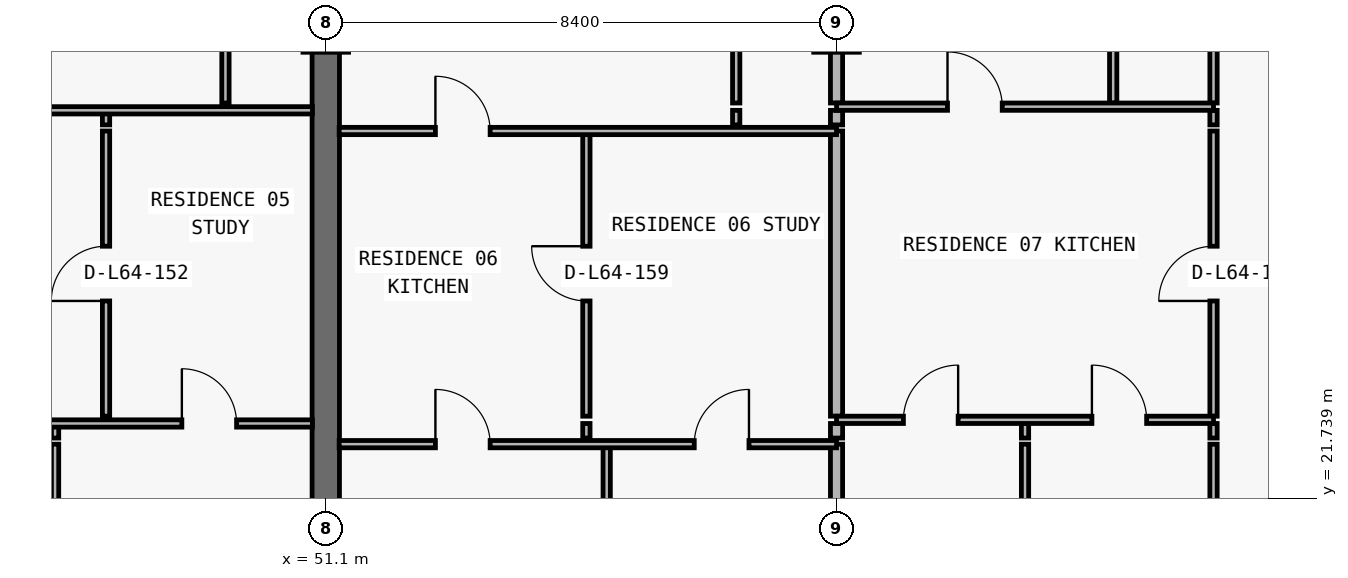
"""IFC4 building model, lengths in metres.
Left out: names, types, materials, properties, quantities, classifications, styles, units other than length and angle.
Written with IfcOpenShell. Run it as: python <this file> out.ifc"""

import sys

from ifc_helpers import new_model, si_unit, direction, frame, frame_2d, origin, place, context, subcontext, project, spatial, rectangle, extrude, element, fill, save


model = new_model("IFC4")
c1 = context("Model", 3, precision=1e-05, world=origin(), true_north=direction((0.0, 1.0)))
c2 = subcontext(c1, "Body", "Model", "MODEL_VIEW")
j1 = project(units=[si_unit("LENGTHUNIT", "METRE"), si_unit("PLANEANGLEUNIT", "RADIAN")], contexts=[c1])
p1 = place(None, origin())
s1 = spatial("IfcSite", under=j1, at=p1, CompositionType="ELEMENT")
p2 = place(p1, origin())
s2 = spatial("IfcBuilding", under=s1, at=p2, CompositionType="ELEMENT")
p3 = place(p2, frame((0.0, 0.0, 229.8)))
s3 = spatial("IfcBuildingStorey", under=s2, at=p3, CompositionType="ELEMENT", Elevation=229.8)
p4 = place(p3, frame((51.1, 20.8, 0.0), z_axis=(0.0, 0.0, 1.0), x_axis=(0.0, 1.0, 0.0)))
e1 = element("IfcWall", 1, at=p4, inside=s3, PredefinedType="SHEAR", context=c2, shape_type="SweptSolid", body=[
    extrude(rectangle(XDim=8.6, YDim=0.45, at=frame_2d((4.3, 0.0))), origin(), (0.0, 0.0, 1.0), 3.05),
])
p5 = place(p3, frame((46.648, 13.34, 0.0), z_axis=(0.0, 0.0, 1.0), x_axis=(0.0, 1.0, 0.0)))
e2 = element("IfcWall", 2, at=p5, inside=s3, PredefinedType="PARTITIONING", context=c2, shape_type="SweptSolid", body=[
    extrude(rectangle(XDim=9.29, YDim=0.12, at=frame_2d((4.645, 0.0))), origin(), (0.0, 0.0, 1.0), 3.05),
])
p6 = place(p3, frame((46.648, 22.73, 0.0), z_axis=(0.0, 0.0, 1.0), x_axis=(0.0, 1.0, 0.0)))
e3 = element("IfcWall", 3, at=p6, inside=s3, PredefinedType="PARTITIONING", context=c2, shape_type="SweptSolid", body=[
    extrude(rectangle(XDim=0.24, YDim=0.12, at=frame_2d((0.12, 0.0))), origin(), (0.0, 0.0, 1.0), 3.05),
])
p7 = place(p3, frame((47.486, 23.09, 0.0), z_axis=(0.0, 0.0, 1.0), x_axis=(0.0, 1.0, 0.0)))
e4 = element("IfcWall", 4, at=p7, inside=s3, PredefinedType="PARTITIONING", context=c2, shape_type="SweptSolid", body=[
    extrude(rectangle(XDim=4.69, YDim=0.12, at=frame_2d((2.345, 0.0))), origin(), (0.0, 0.0, 1.0), 3.05),
])
p8 = place(p7, frame((1.895, 0.0, 0.0)))
e5 = element("IfcOpeningElement", 5, at=p8, cuts=e4, PredefinedType="OPENING", context=c2, shape_type="SweptSolid", body=[
    extrude(rectangle(XDim=0.9, YDim=2.15, at=frame_2d((0.45, 1.075))), frame((0.0, 0.07, 0.0), z_axis=(0.0, -1.0, 0.0), x_axis=(1.0, 0.0, 0.0)), (0.0, 0.0, 1.0), 0.14),
])
p9 = place(p3, frame((47.486, 27.88, 0.0), z_axis=(0.0, 0.0, 1.0), x_axis=(0.0, 1.0, 0.0)))
e6 = element("IfcWall", 6, at=p9, inside=s3, PredefinedType="PARTITIONING", context=c2, shape_type="SweptSolid", body=[
    extrude(rectangle(XDim=0.24, YDim=0.12, at=frame_2d((0.12, 0.0))), origin(), (0.0, 0.0, 1.0), 3.05),
])
p10 = place(p3, frame((49.45, 28.24, 0.0), z_axis=(0.0, 0.0, 1.0), x_axis=(0.0, 1.0, 0.0)))
e7 = element("IfcWall", 7, at=p10, inside=s3, PredefinedType="PARTITIONING", context=c2, shape_type="SweptSolid", body=[
    extrude(rectangle(XDim=6.26, YDim=0.12, at=frame_2d((3.13, 0.0))), origin(), (0.0, 0.0, 1.0), 3.05),
])
p11 = place(p10, frame((2.705, 0.0, 0.0)))
e8 = element("IfcOpeningElement", 8, at=p11, cuts=e7, PredefinedType="OPENING", context=c2, shape_type="SweptSolid", body=[
    extrude(rectangle(XDim=0.85, YDim=2.1, at=frame_2d((0.425, 1.05))), frame((0.0, 0.07, 0.0), z_axis=(0.0, -1.0, 0.0), x_axis=(1.0, 0.0, 0.0)), (0.0, 0.0, 1.0), 0.14),
])
p12 = place(p3, frame((55.386, 22.73, 0.0), z_axis=(0.0, 0.0, 1.0), x_axis=(0.0, 1.0, 0.0)))
e9 = element("IfcWall", 9, at=p12, inside=s3, PredefinedType="PARTITIONING", context=c2, shape_type="SweptSolid", body=[
    extrude(rectangle(XDim=0.24, YDim=0.12, at=frame_2d((0.12, 0.0))), origin(), (0.0, 0.0, 1.0), 3.05),
])
p13 = place(p3, frame((55.386, 23.09, 0.0), z_axis=(0.0, 0.0, 1.0), x_axis=(0.0, 1.0, 0.0)))
e10 = element("IfcWall", 10, at=p13, inside=s3, PredefinedType="PARTITIONING", context=c2, shape_type="SweptSolid", body=[
    extrude(rectangle(XDim=4.69, YDim=0.12, at=frame_2d((2.345, 0.0))), origin(), (0.0, 0.0, 1.0), 3.05),
])
p14 = place(p13, frame((1.895, 0.0, 0.0)))
e11 = element("IfcOpeningElement", 11, at=p14, cuts=e10, PredefinedType="OPENING", context=c2, shape_type="SweptSolid", body=[
    extrude(rectangle(XDim=0.9, YDim=2.15, at=frame_2d((0.45, 1.075))), frame((0.0, 0.07, 0.0), z_axis=(0.0, -1.0, 0.0), x_axis=(1.0, 0.0, 0.0)), (0.0, 0.0, 1.0), 0.14),
])
p15 = place(p3, frame((55.72, 13.34, 0.0), z_axis=(0.0, 0.0, 1.0), x_axis=(0.0, 1.0, 0.0)))
e12 = element("IfcWall", 12, at=p15, inside=s3, PredefinedType="PARTITIONING", context=c2, shape_type="SweptSolid", body=[
    extrude(rectangle(XDim=9.29, YDim=0.12, at=frame_2d((4.645, 0.0))), origin(), (0.0, 0.0, 1.0), 3.05),
])
p16 = place(p3, frame((57.85, 27.88, 0.0), z_axis=(0.0, 0.0, 1.0), x_axis=(0.0, 1.0, 0.0)))
e13 = element("IfcWall", 13, at=p16, inside=s3, PredefinedType="PARTITIONING", context=c2, shape_type="SweptSolid", body=[
    extrude(rectangle(XDim=0.24, YDim=0.12, at=frame_2d((0.12, 0.0))), origin(), (0.0, 0.0, 1.0), 3.05),
])
p17 = place(p3, frame((57.85, 28.24, 0.0), z_axis=(0.0, 0.0, 1.0), x_axis=(0.0, 1.0, 0.0)))
e14 = element("IfcWall", 14, at=p17, inside=s3, PredefinedType="PARTITIONING", context=c2, shape_type="SweptSolid", body=[
    extrude(rectangle(XDim=6.26, YDim=0.12, at=frame_2d((3.13, 0.0))), origin(), (0.0, 0.0, 1.0), 3.05),
])
p18 = place(p17, frame((2.705, 0.0, 0.0)))
e15 = element("IfcOpeningElement", 15, at=p18, cuts=e14, PredefinedType="OPENING", context=c2, shape_type="SweptSolid", body=[
    extrude(rectangle(XDim=0.85, YDim=2.1, at=frame_2d((0.425, 1.05))), frame((0.0, 0.07, 0.0), z_axis=(0.0, -1.0, 0.0), x_axis=(1.0, 0.0, 0.0)), (0.0, 0.0, 1.0), 0.14),
])
p19 = place(p3, frame((59.5, 13.34, 0.0), z_axis=(0.0, 0.0, 1.0), x_axis=(0.0, 1.0, 0.0)))
e16 = element("IfcWall", 16, at=p19, inside=s3, PredefinedType="PARTITIONING", context=c2, shape_type="SweptSolid", body=[
    extrude(rectangle(XDim=9.29, YDim=0.2, at=frame_2d((4.645, 0.0))), origin(), (0.0, 0.0, 1.0), 2.263),
])
p20 = place(p3, frame((59.5, 22.73, 0.0), z_axis=(0.0, 0.0, 1.0), x_axis=(0.0, 1.0, 0.0)))
e17 = element("IfcWall", 17, at=p20, inside=s3, PredefinedType="PARTITIONING", context=c2, shape_type="SweptSolid", body=[
    extrude(rectangle(XDim=0.24, YDim=0.2, at=frame_2d((0.12, 0.0))), origin(), (0.0, 0.0, 1.0), 2.263),
])
p21 = place(p3, frame((59.5, 23.09, 0.0), z_axis=(0.0, 0.0, 1.0), x_axis=(0.0, 1.0, 0.0)))
e18 = element("IfcWall", 18, at=p21, inside=s3, PredefinedType="PARTITIONING", context=c2, shape_type="SweptSolid", body=[
    extrude(rectangle(XDim=4.69, YDim=0.2, at=frame_2d((2.345, 0.0))), origin(), (0.0, 0.0, 1.0), 2.263),
])
p22 = place(p3, frame((59.5, 27.88, 0.0), z_axis=(0.0, 0.0, 1.0), x_axis=(0.0, 1.0, 0.0)))
e19 = element("IfcWall", 19, at=p22, inside=s3, PredefinedType="PARTITIONING", context=c2, shape_type="SweptSolid", body=[
    extrude(rectangle(XDim=0.24, YDim=0.2, at=frame_2d((0.12, 0.0))), origin(), (0.0, 0.0, 1.0), 2.263),
])
p23 = place(p3, frame((59.5, 28.24, 0.0), z_axis=(0.0, 0.0, 1.0), x_axis=(0.0, 1.0, 0.0)))
e20 = element("IfcWall", 20, at=p23, inside=s3, PredefinedType="PARTITIONING", context=c2, shape_type="SweptSolid", body=[
    extrude(rectangle(XDim=6.26, YDim=0.2, at=frame_2d((3.13, 0.0))), origin(), (0.0, 0.0, 1.0), 2.263),
])
p24 = place(p3, frame((62.6, 13.34, 0.0), z_axis=(0.0, 0.0, 1.0), x_axis=(0.0, 1.0, 0.0)))
e21 = element("IfcWall", 21, at=p24, inside=s3, PredefinedType="PARTITIONING", context=c2, shape_type="SweptSolid", body=[
    extrude(rectangle(XDim=9.29, YDim=0.12, at=frame_2d((4.645, 0.0))), origin(), (0.0, 0.0, 1.0), 3.05),
])
p25 = place(p3, frame((62.6, 22.73, 0.0), z_axis=(0.0, 0.0, 1.0), x_axis=(0.0, 1.0, 0.0)))
e22 = element("IfcWall", 22, at=p25, inside=s3, PredefinedType="PARTITIONING", context=c2, shape_type="SweptSolid", body=[
    extrude(rectangle(XDim=0.24, YDim=0.12, at=frame_2d((0.12, 0.0))), origin(), (0.0, 0.0, 1.0), 3.05),
])
p26 = place(p3, frame((64.05, 28.24, 0.0), z_axis=(0.0, 0.0, 1.0), x_axis=(0.0, 1.0, 0.0)))
e23 = element("IfcWall", 23, at=p26, inside=s3, PredefinedType="PARTITIONING", context=c2, shape_type="SweptSolid", body=[
    extrude(rectangle(XDim=6.26, YDim=0.12, at=frame_2d((3.13, 0.0))), origin(), (0.0, 0.0, 1.0), 3.05),
])
p27 = place(p26, frame((2.705, 0.0, 0.0)))
e24 = element("IfcOpeningElement", 24, at=p27, cuts=e23, PredefinedType="OPENING", context=c2, shape_type="SweptSolid", body=[
    extrude(rectangle(XDim=0.85, YDim=2.1, at=frame_2d((0.425, 1.05))), frame((0.0, 0.07, 0.0), z_axis=(0.0, -1.0, 0.0), x_axis=(1.0, 0.0, 0.0)), (0.0, 0.0, 1.0), 0.14),
])
p28 = place(p3, frame((65.7, 13.42, 0.0), z_axis=(0.0, 0.0, 1.0), x_axis=(0.0, 1.0, 0.0)))
e25 = element("IfcWall", 25, at=p28, inside=s3, PredefinedType="PARTITIONING", context=c2, shape_type="SweptSolid", body=[
    extrude(rectangle(XDim=9.21, YDim=0.12, at=frame_2d((4.605, 0.0))), origin(), (0.0, 0.0, 1.0), 3.05),
])
p29 = place(p3, frame((65.7, 22.73, 0.0), z_axis=(0.0, 0.0, 1.0), x_axis=(0.0, 1.0, 0.0)))
e26 = element("IfcWall", 26, at=p29, inside=s3, PredefinedType="PARTITIONING", context=c2, shape_type="SweptSolid", body=[
    extrude(rectangle(XDim=0.24, YDim=0.12, at=frame_2d((0.12, 0.0))), origin(), (0.0, 0.0, 1.0), 3.05),
])
p30 = place(p3, frame((65.7, 23.09, 0.0), z_axis=(0.0, 0.0, 1.0), x_axis=(0.0, 1.0, 0.0)))
e27 = element("IfcWall", 27, at=p30, inside=s3, PredefinedType="PARTITIONING", context=c2, shape_type="SweptSolid", body=[
    extrude(rectangle(XDim=4.69, YDim=0.12, at=frame_2d((2.345, 0.0))), origin(), (0.0, 0.0, 1.0), 3.05),
])
p31 = place(p30, frame((1.895, 0.0, 0.0)))
e28 = element("IfcOpeningElement", 28, at=p31, cuts=e27, PredefinedType="OPENING", context=c2, shape_type="SweptSolid", body=[
    extrude(rectangle(XDim=0.9, YDim=2.15, at=frame_2d((0.45, 1.075))), frame((0.0, 0.07, 0.0), z_axis=(0.0, -1.0, 0.0), x_axis=(1.0, 0.0, 0.0)), (0.0, 0.0, 1.0), 0.14),
])
p32 = place(p3, frame((65.7, 27.88, 0.0), z_axis=(0.0, 0.0, 1.0), x_axis=(0.0, 1.0, 0.0)))
e29 = element("IfcWall", 29, at=p32, inside=s3, PredefinedType="PARTITIONING", context=c2, shape_type="SweptSolid", body=[
    extrude(rectangle(XDim=0.24, YDim=0.12, at=frame_2d((0.12, 0.0))), origin(), (0.0, 0.0, 1.0), 3.05),
])
p33 = place(p3, frame((65.7, 28.24, 0.0), z_axis=(0.0, 0.0, 1.0), x_axis=(0.0, 1.0, 0.0)))
e30 = element("IfcWall", 30, at=p33, inside=s3, PredefinedType="PARTITIONING", context=c2, shape_type="SweptSolid", body=[
    extrude(rectangle(XDim=6.26, YDim=0.12, at=frame_2d((3.13, 0.0))), origin(), (0.0, 0.0, 1.0), 3.05),
])
p34 = place(p3, frame((51.32, 22.63, 0.0), z_axis=(0.0, 0.0, 1.0), x_axis=(1.0, 0.0, 0.0)))
e31 = element("IfcWall", 31, at=p34, inside=s3, PredefinedType="PARTITIONING", context=c2, shape_type="SweptSolid", body=[
    extrude(rectangle(XDim=8.18, YDim=0.12, at=frame_2d((4.09, 0.0))), origin(), (0.0, 0.0, 1.0), 3.05),
])
p35 = place(p34, frame((1.583, 0.0, 0.0)))
e32 = element("IfcOpeningElement", 32, at=p35, cuts=e31, PredefinedType="OPENING", context=c2, shape_type="SweptSolid", body=[
    extrude(rectangle(XDim=0.9, YDim=2.15, at=frame_2d((0.45, 1.075))), frame((0.0, 0.07, 0.0), z_axis=(0.0, -1.0, 0.0), x_axis=(1.0, 0.0, 0.0)), (0.0, 0.0, 1.0), 0.14),
])
p36 = place(p34, frame((5.84, 0.0, 0.0)))
e33 = element("IfcOpeningElement", 33, at=p36, cuts=e31, PredefinedType="OPENING", context=c2, shape_type="SweptSolid", body=[
    extrude(rectangle(XDim=0.9, YDim=2.15, at=frame_2d((0.45, 1.075))), frame((0.0, 0.07, 0.0), z_axis=(0.0, -1.0, 0.0), x_axis=(1.0, 0.0, 0.0)), (0.0, 0.0, 1.0), 0.14),
])
p37 = place(p3, frame((42.7, 22.97, 0.0), z_axis=(0.0, 0.0, 1.0), x_axis=(1.0, 0.0, 0.0)))
e34 = element("IfcWall", 34, at=p37, inside=s3, PredefinedType="PARTITIONING", context=c2, shape_type="SweptSolid", body=[
    extrude(rectangle(XDim=8.18, YDim=0.12, at=frame_2d((4.09, 0.0))), origin(), (0.0, 0.0, 1.0), 3.05),
])
p38 = place(p37, frame((1.524, 0.0, 0.0)))
e35 = element("IfcOpeningElement", 35, at=p38, cuts=e34, PredefinedType="OPENING", context=c2, shape_type="SweptSolid", body=[
    extrude(rectangle(XDim=0.9, YDim=2.15, at=frame_2d((0.45, 1.075))), frame((0.0, 0.07, 0.0), z_axis=(0.0, -1.0, 0.0), x_axis=(1.0, 0.0, 0.0)), (0.0, 0.0, 1.0), 0.14),
])
p39 = place(p37, frame((6.033, 0.0, 0.0)))
e36 = element("IfcOpeningElement", 36, at=p39, cuts=e34, PredefinedType="OPENING", context=c2, shape_type="SweptSolid", body=[
    extrude(rectangle(XDim=0.9, YDim=2.15, at=frame_2d((0.45, 1.075))), frame((0.0, 0.07, 0.0), z_axis=(0.0, -1.0, 0.0), x_axis=(1.0, 0.0, 0.0)), (0.0, 0.0, 1.0), 0.14),
])
p40 = place(p3, frame((59.5, 23.03, 0.0), z_axis=(0.0, 0.0, 1.0), x_axis=(1.0, 0.0, 0.0)))
e37 = element("IfcWall", 37, at=p40, inside=s3, PredefinedType="PARTITIONING", context=c2, shape_type="SweptSolid", body=[
    extrude(rectangle(XDim=6.2, YDim=0.12, at=frame_2d((3.1, 0.0))), origin(), (0.0, 0.0, 1.0), 3.05),
])
p41 = place(p40, frame((1.1, 0.0, 0.0)))
e38 = element("IfcOpeningElement", 38, at=p41, cuts=e37, PredefinedType="OPENING", context=c2, shape_type="SweptSolid", body=[
    extrude(rectangle(XDim=0.9, YDim=2.15, at=frame_2d((0.45, 1.075))), frame((0.0, 0.07, 0.0), z_axis=(0.0, -1.0, 0.0), x_axis=(1.0, 0.0, 0.0)), (0.0, 0.0, 1.0), 0.14),
])
p42 = place(p40, frame((4.2, 0.0, 0.0)))
e39 = element("IfcOpeningElement", 39, at=p42, cuts=e37, PredefinedType="OPENING", context=c2, shape_type="SweptSolid", body=[
    extrude(rectangle(XDim=0.9, YDim=2.15, at=frame_2d((0.45, 1.075))), frame((0.0, 0.07, 0.0), z_axis=(0.0, -1.0, 0.0), x_axis=(1.0, 0.0, 0.0)), (0.0, 0.0, 1.0), 0.14),
])
p43 = place(p3, frame((51.32, 27.78, 0.0), z_axis=(0.0, 0.0, 1.0), x_axis=(1.0, 0.0, 0.0)))
e40 = element("IfcWall", 40, at=p43, inside=s3, PredefinedType="PARTITIONING", context=c2, shape_type="SweptSolid", body=[
    extrude(rectangle(XDim=8.18, YDim=0.12, at=frame_2d((4.09, 0.0))), origin(), (0.0, 0.0, 1.0), 3.05),
])
p44 = place(p43, frame((1.583, 0.0, 0.0)))
e41 = element("IfcOpeningElement", 41, at=p44, cuts=e40, PredefinedType="OPENING", context=c2, shape_type="SweptSolid", body=[
    extrude(rectangle(XDim=0.9, YDim=2.15, at=frame_2d((0.45, 1.075))), frame((0.0, 0.07, 0.0), z_axis=(0.0, -1.0, 0.0), x_axis=(1.0, 0.0, 0.0)), (0.0, 0.0, 1.0), 0.14),
])
p45 = place(p3, frame((42.7, 28.12, 0.0), z_axis=(0.0, 0.0, 1.0), x_axis=(1.0, 0.0, 0.0)))
e42 = element("IfcWall", 42, at=p45, inside=s3, PredefinedType="PARTITIONING", context=c2, shape_type="SweptSolid", body=[
    extrude(rectangle(XDim=8.18, YDim=0.12, at=frame_2d((4.09, 0.0))), origin(), (0.0, 0.0, 1.0), 3.05),
])
p46 = place(p45, frame((1.943, 0.0, 0.0)))
e43 = element("IfcOpeningElement", 43, at=p46, cuts=e42, PredefinedType="OPENING", context=c2, shape_type="SweptSolid", body=[
    extrude(rectangle(XDim=0.9, YDim=2.15, at=frame_2d((0.45, 1.075))), frame((0.0, 0.07, 0.0), z_axis=(0.0, -1.0, 0.0), x_axis=(1.0, 0.0, 0.0)), (0.0, 0.0, 1.0), 0.14),
])
p47 = place(p3, frame((59.5, 28.18, 0.0), z_axis=(0.0, 0.0, 1.0), x_axis=(1.0, 0.0, 0.0)))
e44 = element("IfcWall", 44, at=p47, inside=s3, PredefinedType="PARTITIONING", context=c2, shape_type="SweptSolid", body=[
    extrude(rectangle(XDim=6.2, YDim=0.12, at=frame_2d((3.1, 0.0))), origin(), (0.0, 0.0, 1.0), 3.05),
])
p48 = place(p47, frame((1.825, 0.0, 0.0)))
e45 = element("IfcOpeningElement", 45, at=p48, cuts=e44, PredefinedType="OPENING", context=c2, shape_type="SweptSolid", body=[
    extrude(rectangle(XDim=0.9, YDim=2.15, at=frame_2d((0.45, 1.075))), frame((0.0, 0.07, 0.0), z_axis=(0.0, -1.0, 0.0), x_axis=(1.0, 0.0, 0.0)), (0.0, 0.0, 1.0), 0.14),
])
p49 = place(p8, origin())
e46 = element("IfcDoor", 46, at=p49, inside=s3, OperationType="SINGLE_SWING_LEFT", PredefinedType="DOOR", context=c2, shape_type="SweptSolid", body=[
    extrude(rectangle(XDim=0.9, YDim=2.15, at=frame_2d((0.45, 1.075))), frame((0.0, 0.025, 0.0), z_axis=(0.0, -1.0, 0.0), x_axis=(1.0, 0.0, 0.0)), (0.0, 0.0, 1.0), 0.05),
])
fill(e5, e46)
p50 = place(p39, origin())
e47 = element("IfcDoor", 47, at=p50, inside=s3, OperationType="SINGLE_SWING_LEFT", PredefinedType="DOOR", context=c2, shape_type="SweptSolid", body=[
    extrude(rectangle(XDim=0.9, YDim=2.15, at=frame_2d((0.45, 1.075))), frame((0.0, 0.025, 0.0), z_axis=(0.0, -1.0, 0.0), x_axis=(1.0, 0.0, 0.0)), (0.0, 0.0, 1.0), 0.05),
])
fill(e36, e47)
p51 = place(p44, origin())
e48 = element("IfcDoor", 48, at=p51, inside=s3, OperationType="SINGLE_SWING_LEFT", PredefinedType="DOOR", context=c2, shape_type="SweptSolid", body=[
    extrude(rectangle(XDim=0.9, YDim=2.15, at=frame_2d((0.45, 1.075))), frame((0.0, 0.025, 0.0), z_axis=(0.0, -1.0, 0.0), x_axis=(1.0, 0.0, 0.0)), (0.0, 0.0, 1.0), 0.05),
])
fill(e41, e48)
p52 = place(p14, origin())
e49 = element("IfcDoor", 49, at=p52, inside=s3, OperationType="SINGLE_SWING_RIGHT", PredefinedType="DOOR", context=c2, shape_type="SweptSolid", body=[
    extrude(rectangle(XDim=0.9, YDim=2.15, at=frame_2d((0.45, 1.075))), frame((0.0, 0.025, 0.0), z_axis=(0.0, -1.0, 0.0), x_axis=(1.0, 0.0, 0.0)), (0.0, 0.0, 1.0), 0.05),
])
fill(e11, e49)
p53 = place(p35, origin())
e50 = element("IfcDoor", 50, at=p53, inside=s3, OperationType="SINGLE_SWING_LEFT", PredefinedType="DOOR", context=c2, shape_type="SweptSolid", body=[
    extrude(rectangle(XDim=0.9, YDim=2.15, at=frame_2d((0.45, 1.075))), frame((0.0, 0.025, 0.0), z_axis=(0.0, -1.0, 0.0), x_axis=(1.0, 0.0, 0.0)), (0.0, 0.0, 1.0), 0.05),
])
fill(e32, e50)
p54 = place(p36, origin())
e51 = element("IfcDoor", 51, at=p54, inside=s3, OperationType="SINGLE_SWING_RIGHT", PredefinedType="DOOR", context=c2, shape_type="SweptSolid", body=[
    extrude(rectangle(XDim=0.9, YDim=2.15, at=frame_2d((0.45, 1.075))), frame((0.0, 0.025, 0.0), z_axis=(0.0, -1.0, 0.0), x_axis=(1.0, 0.0, 0.0)), (0.0, 0.0, 1.0), 0.05),
])
fill(e33, e51)
p55 = place(p48, origin())
e52 = element("IfcDoor", 52, at=p55, inside=s3, OperationType="SINGLE_SWING_LEFT", PredefinedType="DOOR", context=c2, shape_type="SweptSolid", body=[
    extrude(rectangle(XDim=0.9, YDim=2.15, at=frame_2d((0.45, 1.075))), frame((0.0, 0.025, 0.0), z_axis=(0.0, -1.0, 0.0), x_axis=(1.0, 0.0, 0.0)), (0.0, 0.0, 1.0), 0.05),
])
fill(e45, e52)
p56 = place(p41, origin())
e53 = element("IfcDoor", 53, at=p56, inside=s3, OperationType="SINGLE_SWING_RIGHT", PredefinedType="DOOR", context=c2, shape_type="SweptSolid", body=[
    extrude(rectangle(XDim=0.9, YDim=2.15, at=frame_2d((0.45, 1.075))), frame((0.0, 0.025, 0.0), z_axis=(0.0, -1.0, 0.0), x_axis=(1.0, 0.0, 0.0)), (0.0, 0.0, 1.0), 0.05),
])
fill(e38, e53)
p57 = place(p42, origin())
e54 = element("IfcDoor", 54, at=p57, inside=s3, OperationType="SINGLE_SWING_LEFT", PredefinedType="DOOR", context=c2, shape_type="SweptSolid", body=[
    extrude(rectangle(XDim=0.9, YDim=2.15, at=frame_2d((0.45, 1.075))), frame((0.0, 0.025, 0.0), z_axis=(0.0, -1.0, 0.0), x_axis=(1.0, 0.0, 0.0)), (0.0, 0.0, 1.0), 0.05),
])
fill(e39, e54)
p58 = place(p31, origin())
e55 = element("IfcDoor", 55, at=p58, inside=s3, OperationType="SINGLE_SWING_LEFT", PredefinedType="DOOR", context=c2, shape_type="SweptSolid", body=[
    extrude(rectangle(XDim=0.9, YDim=2.15, at=frame_2d((0.45, 1.075))), frame((0.0, 0.025, 0.0), z_axis=(0.0, -1.0, 0.0), x_axis=(1.0, 0.0, 0.0)), (0.0, 0.0, 1.0), 0.05),
])
fill(e28, e55)
save(model, sys.argv[1])
